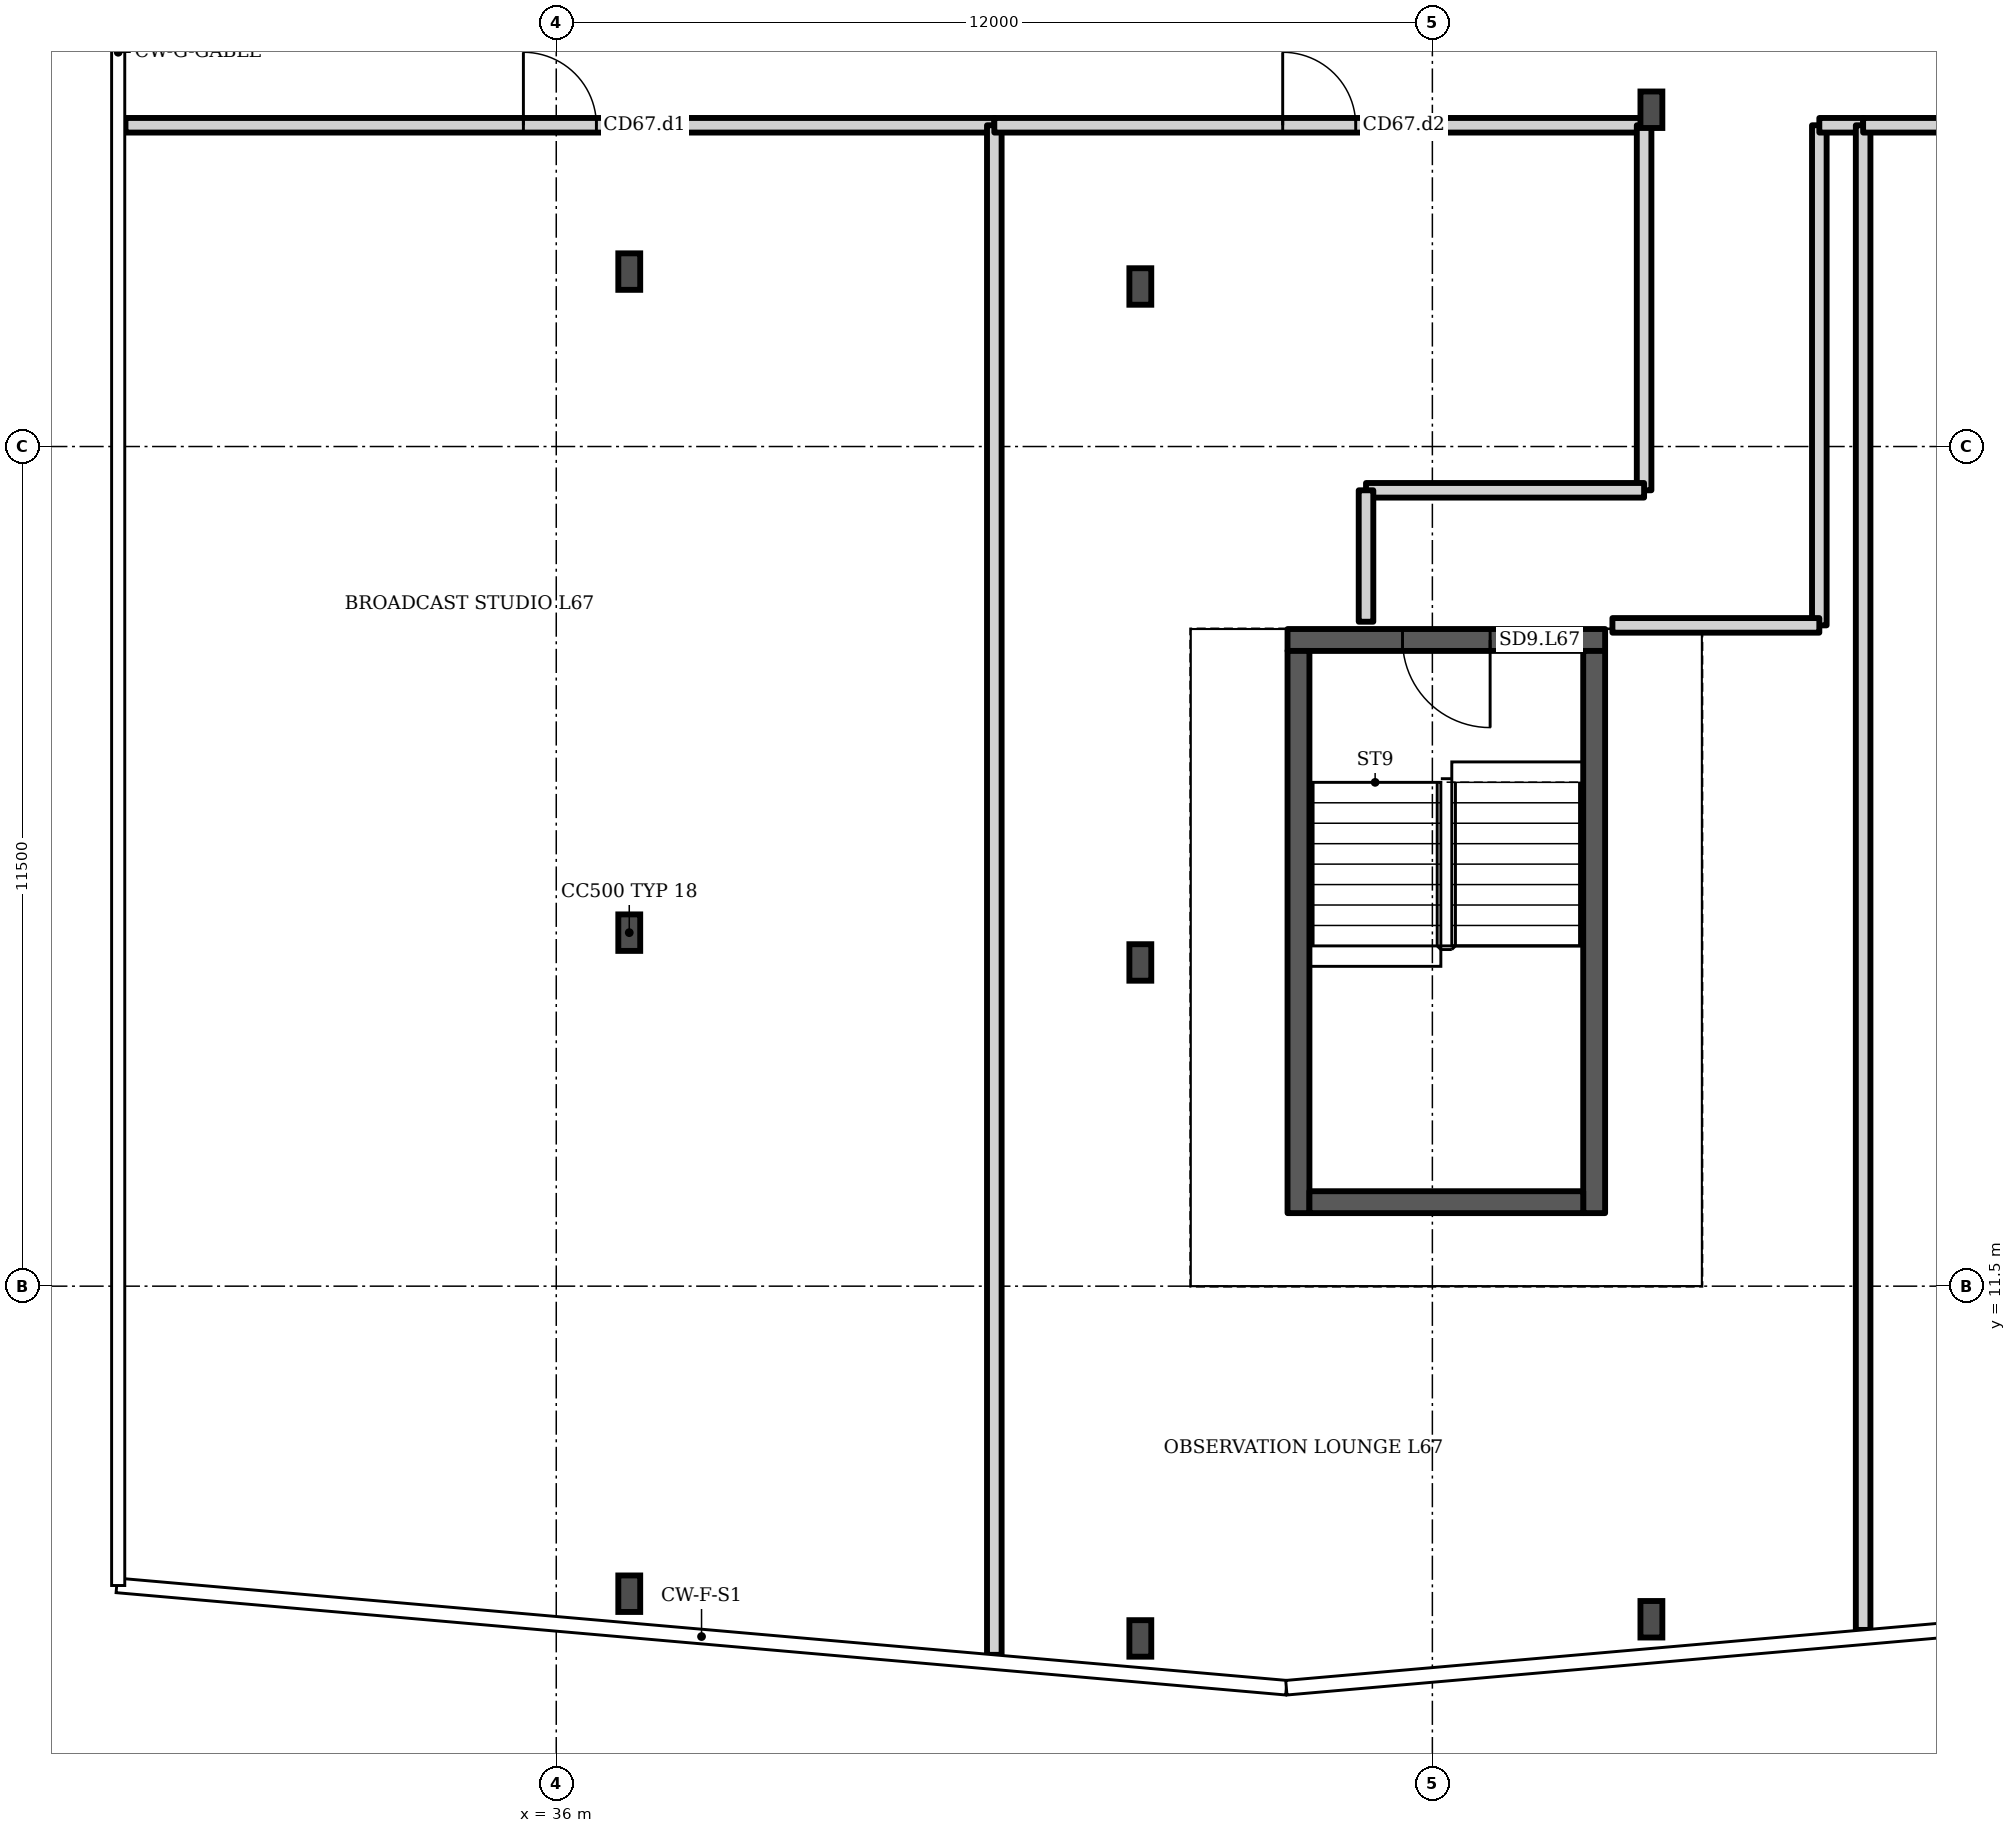
"""IFC4 building model, lengths in metres.
Left out: names, types, materials, properties, quantities, classifications, styles, units other than length and angle.
Written with IfcOpenShell. Run it as: python <this file> out.ifc"""

import sys

from ifc_helpers import new_model, si_unit, direction, frame, frame_2d, origin, origin_2d, place, context, subcontext, project, spatial, rectangle, i_section, extrude, element, fill, save


model = new_model("IFC4")
c1 = context("Model", 3, precision=1e-05, world=origin(), true_north=direction((0.0, 1.0)))
c2 = subcontext(c1, "Body", "Model", "MODEL_VIEW")
j1 = project(units=[si_unit("LENGTHUNIT", "METRE"), si_unit("PLANEANGLEUNIT", "RADIAN")], contexts=[c1])
p1 = place(None, origin())
s1 = spatial("IfcSite", under=j1, at=p1, CompositionType="ELEMENT")
p2 = place(p1, origin())
s2 = spatial("IfcBuilding", under=s1, at=p2, CompositionType="ELEMENT")
p3 = place(p2, frame((0.0, 0.0, 261.1)))
s3 = spatial("IfcBuildingStorey", under=s2, at=p3, CompositionType="ELEMENT", Elevation=261.1)
for number, where, z_axis, x_axis in (
    (1, (30.0, 7.9, 0.0), (0.0, 0.0, 1.0), (1.0, 0.0, 0.0)),
    (2, (30.0, 16.75, 0.0), (0.0, 0.0, 1.0), (1.0, 0.0, 0.0)),
    (3, (30.0, 25.6, 0.0), (0.0, 0.0, 1.0), (1.0, 0.0, 0.0)),
):
    element("IfcColumn", number, at=place(p3, frame(where, z_axis=z_axis, x_axis=x_axis)), inside=s3, PredefinedType="COLUMN", context=c2, shape_type="SweptSolid", body=[
        extrude(i_section(OverallWidth=0.3, OverallDepth=0.5, WebThickness=0.014, FlangeThickness=0.028, FilletRadius=0.027, at=origin_2d()), origin(), (0.0, 0.0, 1.0), 5.194),
    ])
p4 = place(p2, frame((0.0, 0.0, 264.3)))
s4 = spatial("IfcBuildingStorey", under=s2, at=p4, CompositionType="ELEMENT", Elevation=264.3)
for number, where, z_axis, x_axis in (
    (4, (37.0, 7.288, 0.0), (0.0, 0.0, 1.0), (1.0, 0.0, 0.0)),
    (5, (37.0, 16.342, 0.0), (0.0, 0.0, 1.0), (1.0, 0.0, 0.0)),
    (6, (37.0, 25.396, 0.0), (0.0, 0.0, 1.0), (1.0, 0.0, 0.0)),
):
    element("IfcColumn", number, at=place(p4, frame(where, z_axis=z_axis, x_axis=x_axis)), inside=s4, PredefinedType="COLUMN", context=c2, shape_type="SweptSolid", body=[
        extrude(i_section(OverallWidth=0.3, OverallDepth=0.5, WebThickness=0.014, FlangeThickness=0.028, FilletRadius=0.027, at=origin_2d()), origin(), (0.0, 0.0, 1.0), 4.822),
    ])
for number, where, z_axis, x_axis in (
    (7, (44.0, 6.675, 0.0), (0.0, 0.0, 1.0), (1.0, 0.0, 0.0)),
    (8, (44.0, 15.934, 0.0), (0.0, 0.0, 1.0), (1.0, 0.0, 0.0)),
    (9, (44.0, 25.192, 0.0), (0.0, 0.0, 1.0), (1.0, 0.0, 0.0)),
    (10, (51.0, 6.938, 0.0), (0.0, 0.0, 1.0), (1.0, 0.0, 0.0)),
    (11, (51.0, 27.613, 0.0), (0.0, 0.0, 1.0), (1.0, 0.0, 0.0)),
):
    element("IfcColumn", number, at=place(p4, frame(where, z_axis=z_axis, x_axis=x_axis)), inside=s4, PredefinedType="COLUMN", context=c2, shape_type="SweptSolid", body=[
        extrude(i_section(OverallWidth=0.3, OverallDepth=0.5, WebThickness=0.014, FlangeThickness=0.028, FilletRadius=0.027, at=origin_2d()), origin(), (0.0, 0.0, 1.0), 3.2),
    ])
p5 = place(p4, frame((30.1, 27.4, 0.0), z_axis=(0.0, 0.0, 1.0), x_axis=(1.0, 0.0, 0.0)))
e12 = element("IfcWall", 12, at=p5, inside=s4, PredefinedType="PARTITIONING", context=c2, shape_type="SweptSolid", body=[
    extrude(rectangle(XDim=11.9, YDim=0.2, at=frame_2d((5.95, 0.0))), origin(), (0.0, 0.0, 1.0), 2.8),
])
p6 = place(p5, frame((5.45, 0.0, 0.0)))
e13 = element("IfcOpeningElement", 13, at=p6, cuts=e12, PredefinedType="OPENING", context=c2, shape_type="SweptSolid", body=[
    extrude(rectangle(XDim=1.0, YDim=2.1, at=frame_2d((0.5, 1.05))), frame((0.0, 0.11, 0.0), z_axis=(0.0, -1.0, 0.0), x_axis=(1.0, 0.0, 0.0)), (0.0, 0.0, 1.0), 0.22),
])
p7 = place(p4, frame((42.0, 27.4, 0.0), z_axis=(0.0, 0.0, 1.0), x_axis=(0.0, -1.0, 0.0)))
e14 = element("IfcWall", 14, at=p7, inside=s4, PredefinedType="PARTITIONING", context=c2, shape_type="SweptSolid", body=[
    extrude(rectangle(XDim=20.949, YDim=0.2, at=frame_2d((10.475, 0.0))), origin(), (0.0, 0.0, 1.0), 2.8),
])
p8 = place(p4, frame((53.3, 20.55, 0.0), z_axis=(0.0, 0.0, 1.0), x_axis=(0.0, 1.0, 0.0)))
e15 = element("IfcWall", 15, at=p8, inside=s4, PredefinedType="PARTITIONING", context=c2, shape_type="SweptSolid", body=[
    extrude(rectangle(XDim=6.85, YDim=0.2, at=frame_2d((3.425, 0.0))), origin(), (0.0, 0.0, 1.0), 2.8),
])
p9 = place(p4, frame((53.3, 27.4, 0.0), z_axis=(0.0, 0.0, 1.0), x_axis=(1.0, 0.0, 0.0)))
e16 = element("IfcWall", 16, at=p9, inside=s4, PredefinedType="PARTITIONING", context=c2, shape_type="SweptSolid", body=[
    extrude(rectangle(XDim=0.6, YDim=0.2, at=frame_2d((0.3, 0.0))), origin(), (0.0, 0.0, 1.0), 2.8),
])
p10 = place(p4, frame((42.0, 27.4, 0.0), z_axis=(0.0, 0.0, 1.0), x_axis=(1.0, 0.0, 0.0)))
e17 = element("IfcWall", 17, at=p10, inside=s4, PredefinedType="PARTITIONING", context=c2, shape_type="SweptSolid", body=[
    extrude(rectangle(XDim=8.9, YDim=0.2, at=frame_2d((4.45, 0.0))), origin(), (0.0, 0.0, 1.0), 2.8),
])
p11 = place(p10, frame((3.95, 0.0, 0.0)))
e18 = element("IfcOpeningElement", 18, at=p11, cuts=e17, PredefinedType="OPENING", context=c2, shape_type="SweptSolid", body=[
    extrude(rectangle(XDim=1.0, YDim=2.1, at=frame_2d((0.5, 1.05))), frame((0.0, 0.11, 0.0), z_axis=(0.0, -1.0, 0.0), x_axis=(1.0, 0.0, 0.0)), (0.0, 0.0, 1.0), 0.22),
])
p12 = place(p4, frame((50.9, 27.4, 0.0), z_axis=(0.0, 0.0, 1.0), x_axis=(0.0, -1.0, 0.0)))
e19 = element("IfcWall", 19, at=p12, inside=s4, PredefinedType="PARTITIONING", context=c2, shape_type="SweptSolid", body=[
    extrude(rectangle(XDim=5.0, YDim=0.2, at=frame_2d((2.5, 0.0))), origin(), (0.0, 0.0, 1.0), 2.8),
])
p13 = place(p4, frame((50.9, 22.4, 0.0), z_axis=(0.0, 0.0, 1.0), x_axis=(-1.0, 0.0, 0.0)))
e20 = element("IfcWall", 20, at=p13, inside=s4, PredefinedType="PARTITIONING", context=c2, shape_type="SweptSolid", body=[
    extrude(rectangle(XDim=3.809, YDim=0.2, at=frame_2d((1.904, 0.0))), origin(), (0.0, 0.0, 1.0), 2.8),
])
p14 = place(p4, frame((47.091, 22.4, 0.0), z_axis=(0.0, 0.0, 1.0), x_axis=(0.0, -1.0, 0.0)))
e21 = element("IfcWall", 21, at=p14, inside=s4, PredefinedType="PARTITIONING", context=c2, shape_type="SweptSolid", body=[
    extrude(rectangle(XDim=1.8, YDim=0.2, at=frame_2d((0.9, 0.0))), origin(), (0.0, 0.0, 1.0), 2.8),
])
p15 = place(p4, frame((50.466, 20.55, 0.0), z_axis=(0.0, 0.0, 1.0), x_axis=(1.0, 0.0, 0.0)))
e22 = element("IfcWall", 22, at=p15, inside=s4, PredefinedType="PARTITIONING", context=c2, shape_type="SweptSolid", body=[
    extrude(rectangle(XDim=2.834, YDim=0.2, at=frame_2d((1.417, 0.0))), origin(), (0.0, 0.0, 1.0), 2.8),
])
p16 = place(p4, frame((53.9, 27.4, 0.0), z_axis=(0.0, 0.0, 1.0), x_axis=(0.0, -1.0, 0.0)))
e23 = element("IfcWall", 23, at=p16, inside=s4, PredefinedType="PARTITIONING", context=c2, shape_type="SweptSolid", body=[
    extrude(rectangle(XDim=20.608, YDim=0.2, at=frame_2d((10.304, 0.0))), origin(), (0.0, 0.0, 1.0), 2.8),
])
p17 = place(p4, frame((53.9, 27.4, 0.0), z_axis=(0.0, 0.0, 1.0), x_axis=(1.0, 0.0, 0.0)))
e24 = element("IfcWall", 24, at=p17, inside=s4, PredefinedType="PARTITIONING", context=c2, shape_type="SweptSolid", body=[
    extrude(rectangle(XDim=4.5, YDim=0.2, at=frame_2d((2.25, 0.0))), origin(), (0.0, 0.0, 1.0), 2.8),
])
p18 = place(p4, frame((46.016, 20.35, 0.0), z_axis=(0.0, 0.0, 1.0), x_axis=(1.0, 0.0, 0.0)))
e25 = element("IfcWall", 25, at=p18, inside=s4, PredefinedType="SHEAR", context=c2, shape_type="SweptSolid", body=[
    extrude(rectangle(XDim=4.35, YDim=0.3, at=frame_2d((2.175, 0.0))), origin(), (0.0, 0.0, 1.0), 2.8),
])
p19 = place(p18, frame((1.575, 0.0, 0.0)))
e26 = element("IfcOpeningElement", 26, at=p19, cuts=e25, PredefinedType="OPENING", context=c2, shape_type="SweptSolid", body=[
    extrude(rectangle(XDim=1.2, YDim=2.1, at=frame_2d((0.6, 1.05))), frame((0.0, 0.16, 0.0), z_axis=(0.0, -1.0, 0.0), x_axis=(1.0, 0.0, 0.0)), (0.0, 0.0, 1.0), 0.32),
])
for number, where, z_axis, x_axis in (
    (27, (46.166, 12.5, 0.0), (0.0, 0.0, 1.0), (0.0, 1.0, 0.0)),
    (28, (50.216, 12.5, 0.0), (0.0, 0.0, 1.0), (0.0, 1.0, 0.0)),
):
    element("IfcWall", number, at=place(p4, frame(where, z_axis=z_axis, x_axis=x_axis)), inside=s4, PredefinedType="SHEAR", context=c2, shape_type="SweptSolid", body=[
        extrude(rectangle(XDim=7.7, YDim=0.3, at=frame_2d((3.85, 0.0))), origin(), (0.0, 0.0, 1.0), 2.8),
    ])
p20 = place(p4, frame((46.316, 12.65, 0.0), z_axis=(0.0, 0.0, 1.0), x_axis=(1.0, 0.0, 0.0)))
e29 = element("IfcWall", 29, at=p20, inside=s4, PredefinedType="SHEAR", context=c2, shape_type="SweptSolid", body=[
    extrude(rectangle(XDim=3.75, YDim=0.3, at=frame_2d((1.875, 0.0))), origin(), (0.0, 0.0, 1.0), 2.8),
])
p21 = place(p6, origin())
e30 = element("IfcDoor", 30, at=p21, inside=s4, OperationType="SINGLE_SWING_LEFT", PredefinedType="DOOR", context=c2, shape_type="SweptSolid", body=[
    extrude(rectangle(XDim=1.0, YDim=2.1, at=frame_2d((0.5, 1.05))), frame((0.0, 0.025, 0.0), z_axis=(0.0, -1.0, 0.0), x_axis=(1.0, 0.0, 0.0)), (0.0, 0.0, 1.0), 0.05),
])
fill(e13, e30)
p22 = place(p11, origin())
e31 = element("IfcDoor", 31, at=p22, inside=s4, OperationType="SINGLE_SWING_LEFT", PredefinedType="DOOR", context=c2, shape_type="SweptSolid", body=[
    extrude(rectangle(XDim=1.0, YDim=2.1, at=frame_2d((0.5, 1.05))), frame((0.0, 0.025, 0.0), z_axis=(0.0, -1.0, 0.0), x_axis=(1.0, 0.0, 0.0)), (0.0, 0.0, 1.0), 0.05),
])
fill(e18, e31)
p23 = place(p19, origin())
e32 = element("IfcDoor", 32, at=p23, inside=s4, OperationType="SINGLE_SWING_RIGHT", PredefinedType="DOOR", context=c2, shape_type="SweptSolid", body=[
    extrude(rectangle(XDim=1.2, YDim=2.1, at=frame_2d((0.6, 1.05))), frame((0.0, 0.025, 0.0), z_axis=(0.0, -1.0, 0.0), x_axis=(1.0, 0.0, 0.0)), (0.0, 0.0, 1.0), 0.05),
])
fill(e26, e32)
save(model, sys.argv[1])
